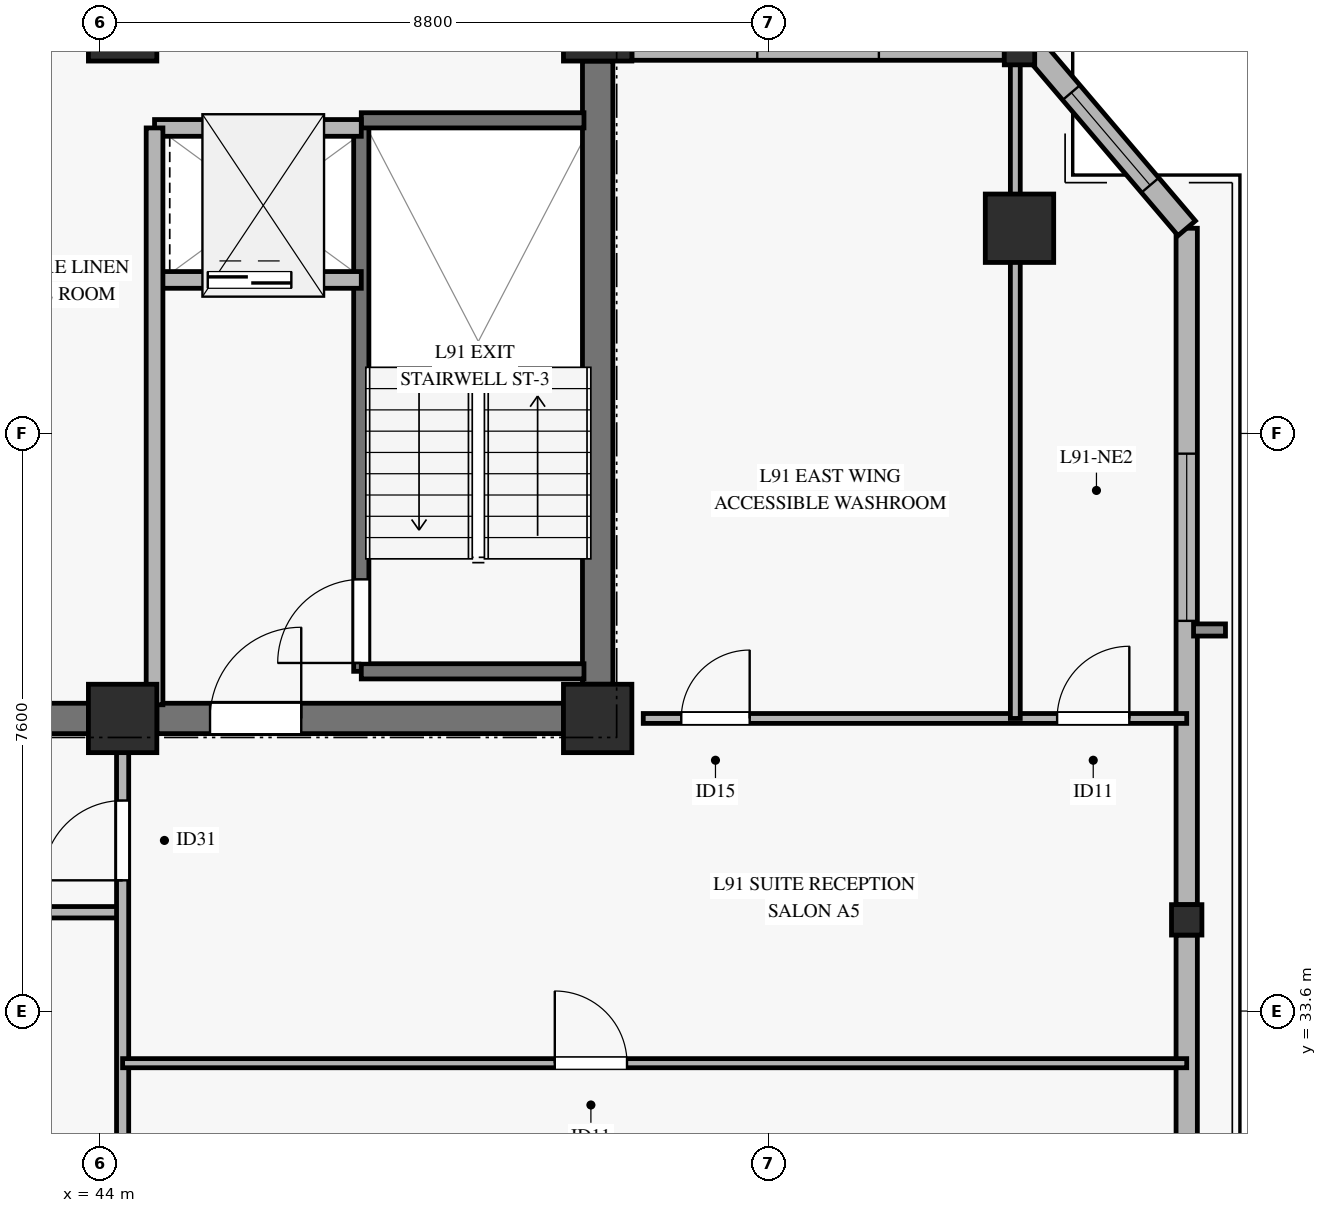
"""IFC4 building model, lengths in metres.
Left out: names, types, materials, properties, quantities, classifications, styles, units other than length and angle.
Written with IfcOpenShell. Run it as: python <this file> out.ifc"""

import sys

from ifc_helpers import new_model, si_unit, direction, frame, frame_2d, origin, origin_2d, place, context, subcontext, project, spatial, rectangle, hollow_rectangle, extrude, source, transform, mapped, element, fill, save


model = new_model("IFC4")
c1 = context("Model", 3, precision=1e-05, world=origin(), true_north=direction((0.0, 1.0)))
c2 = subcontext(c1, "Body", "Model", "MODEL_VIEW")
j1 = project(units=[si_unit("LENGTHUNIT", "METRE"), si_unit("PLANEANGLEUNIT", "RADIAN")], contexts=[c1])
p1 = place(None, origin())
s1 = spatial("IfcSite", under=j1, at=p1, CompositionType="ELEMENT")
p2 = place(p1, origin())
s2 = spatial("IfcBuilding", under=s1, at=p2, CompositionType="ELEMENT")
p3 = place(p2, frame((0.0, 0.0, 349.3)))
s3 = spatial("IfcBuildingStorey", under=s2, at=p3, CompositionType="ELEMENT", Elevation=349.3)
m1 = source(origin(), c2, "Body", "SweptSolid", [
    extrude(rectangle(XDim=0.9, YDim=0.9, at=origin_2d()), origin(), (0.0, 0.0, 1.0), 3.08),
])
for number, where, z_axis, x_axis in (
    (1, (44.3, 37.45, 0.0), (0.0, 0.0, 1.0), (1.0, 0.0, 0.0)),
    (2, (44.3, 46.55, 0.0), (0.0, 0.0, 1.0), (1.0, 0.0, 0.0)),
    (3, (50.55, 37.45, 0.0), (0.0, 0.0, 1.0), (1.0, 0.0, 0.0)),
    (4, (50.55, 46.55, 0.0), (0.0, 0.0, 1.0), (1.0, 0.0, 0.0)),
):
    element("IfcColumn", number, at=place(p3, frame(where, z_axis=z_axis, x_axis=x_axis)), inside=s3, PredefinedType="PILASTER", context=c2, shape_type="MappedRepresentation", body=[
        mapped(m1, transform((0.0, 0.0, 0.0), x_axis=(1.0, 0.0, 0.0), y_axis=(0.0, 1.0, 0.0), z_axis=(0.0, 0.0, 1.0), scale=1.0)),
    ])
p4 = place(p3, frame((36.05, 37.45, 0.0), z_axis=(0.0, 0.0, 1.0), x_axis=(1.0, 0.0, 0.0)))
e5 = element("IfcWall", 5, at=p4, inside=s3, PredefinedType="SHEAR", context=c2, shape_type="SweptSolid", body=[
    extrude(rectangle(XDim=7.8, YDim=0.4, at=frame_2d((3.9, 0.0))), origin(), (0.0, 0.0, 1.0), 3.08),
])
p5 = place(p3, frame((44.75, 37.45, 0.0), z_axis=(0.0, 0.0, 1.0), x_axis=(1.0, 0.0, 0.0)))
e6 = element("IfcWall", 6, at=p5, inside=s3, PredefinedType="SHEAR", context=c2, shape_type="SweptSolid", body=[
    extrude(rectangle(XDim=5.35, YDim=0.4, at=frame_2d((2.675, 0.0))), origin(), (0.0, 0.0, 1.0), 3.08),
])
p6 = place(p5, frame((0.7, 0.0, 0.0)))
e7 = element("IfcOpeningElement", 7, at=p6, cuts=e6, PredefinedType="OPENING", context=c2, shape_type="SweptSolid", body=[
    extrude(rectangle(XDim=1.2, YDim=2.15, at=frame_2d((0.6, 1.075))), frame((0.0, 0.21, 0.0), z_axis=(0.0, -1.0, 0.0), x_axis=(1.0, 0.0, 0.0)), (0.0, 0.0, 1.0), 0.42),
])
p7 = place(p3, frame((50.55, 37.9, 0.0), z_axis=(0.0, 0.0, 1.0), x_axis=(0.0, 1.0, 0.0)))
e8 = element("IfcWall", 8, at=p7, inside=s3, PredefinedType="SHEAR", context=c2, shape_type="SweptSolid", body=[
    extrude(rectangle(XDim=8.2, YDim=0.4, at=frame_2d((4.1, 0.0))), origin(), (0.0, 0.0, 1.0), 3.08),
])
m2 = source(origin(), c2, "Body", "SweptSolid", [
    extrude(hollow_rectangle(XDim=0.9, YDim=0.9, WallThickness=0.04, at=origin_2d()), origin(), (0.0, 0.0, 1.0), 3.08),
])
p8 = place(p3, frame((56.1, 43.9, 0.0), z_axis=(0.0, 0.0, 1.0), x_axis=(1.0, 0.0, 0.0)))
e9 = element("IfcColumn", 9, at=p8, inside=s3, PredefinedType="COLUMN", context=c2, shape_type="MappedRepresentation", body=[
    mapped(m2, transform((0.0, 0.0, 0.0), x_axis=(1.0, 0.0, 0.0), y_axis=(0.0, 1.0, 0.0), z_axis=(0.0, 0.0, 1.0), scale=1.0)),
])
m3 = source(origin(), c2, "Body", "SweptSolid", [
    extrude(hollow_rectangle(XDim=0.4, YDim=0.4, WallThickness=0.02, at=origin_2d()), origin(), (0.0, 0.0, 1.0), 3.08),
])
for number, where, z_axis, x_axis in (
    (10, (58.3, 34.8, 0.0), (0.0, 0.0, 1.0), (1.0, 0.0, 0.0)),
    (11, (56.1, 46.25, 0.0), (0.0, 0.0, 1.0), (1.0, 0.0, 0.0)),
):
    element("IfcColumn", number, at=place(p3, frame(where, z_axis=z_axis, x_axis=x_axis)), inside=s3, PredefinedType="COLUMN", context=c2, shape_type="MappedRepresentation", body=[
        mapped(m3, transform((0.0, 0.0, 0.0), x_axis=(1.0, 0.0, 0.0), y_axis=(0.0, 1.0, 0.0), z_axis=(0.0, 0.0, 1.0), scale=1.0)),
    ])
p9 = place(p3, frame((58.3, 25.7, 0.0), z_axis=(0.0, 0.0, 1.0), x_axis=(0.0, 1.0, 0.0)))
e12 = element("IfcWall", 12, at=p9, inside=s3, PredefinedType="SOLIDWALL", context=c2, shape_type="SweptSolid", body=[
    extrude(rectangle(XDim=8.9, YDim=0.28, at=frame_2d((4.45, 0.0))), origin(), (0.0, 0.0, 1.0), 2.71),
])
p10 = place(p9, frame((0.468, 0.0, 0.35)))
e13 = element("IfcOpeningElement", 13, at=p10, cuts=e12, PredefinedType="OPENING", context=c2, shape_type="SweptSolid", body=[
    extrude(rectangle(XDim=1.6, YDim=2.0, at=frame_2d((0.8, 1.0))), frame((0.0, 0.15, 0.0), z_axis=(0.0, -1.0, 0.0), x_axis=(1.0, 0.0, 0.0)), (0.0, 0.0, 1.0), 0.3),
])
p11 = place(p3, frame((58.3, 35.0, 0.0), z_axis=(0.0, 0.0, 1.0), x_axis=(0.0, 1.0, 0.0)))
e14 = element("IfcWall", 14, at=p11, inside=s3, PredefinedType="SOLIDWALL", context=c2, shape_type="SweptSolid", body=[
    extrude(rectangle(XDim=8.9, YDim=0.28, at=frame_2d((4.45, 0.0))), origin(), (0.0, 0.0, 1.0), 2.71),
])
p12 = place(p11, frame((3.734, 0.0, 0.35)))
e15 = element("IfcOpeningElement", 15, at=p12, cuts=e14, PredefinedType="OPENING", context=c2, shape_type="SweptSolid", body=[
    extrude(rectangle(XDim=2.2, YDim=2.1, at=frame_2d((1.1, 1.05))), frame((0.0, 0.15, 0.0), z_axis=(0.0, -1.0, 0.0), x_axis=(1.0, 0.0, 0.0)), (0.0, 0.0, 1.0), 0.3),
])
p13 = place(p3, frame((51.0, 46.25, 0.0), z_axis=(0.0, 0.0, 1.0), x_axis=(1.0, 0.0, 0.0)))
e16 = element("IfcWall", 16, at=p13, inside=s3, PredefinedType="SOLIDWALL", context=c2, shape_type="SweptSolid", body=[
    extrude(rectangle(XDim=4.9, YDim=0.28, at=frame_2d((2.45, 0.0))), origin(), (0.0, 0.0, 1.0), 2.71),
])
p14 = place(p13, frame((1.65, 0.0, 0.45)))
e17 = element("IfcOpeningElement", 17, at=p14, cuts=e16, PredefinedType="OPENING", context=c2, shape_type="SweptSolid", body=[
    extrude(rectangle(XDim=1.6, YDim=2.0, at=frame_2d((0.8, 1.0))), frame((0.0, 0.15, 0.0), z_axis=(0.0, -1.0, 0.0), x_axis=(1.0, 0.0, 0.0)), (0.0, 0.0, 1.0), 0.3),
])
p15 = place(p3, frame((58.3, 43.9, 0.0), z_axis=(0.0, 0.0, 1.0), x_axis=(-0.648103010114, 0.761552682538, 0.0)))
e18 = element("IfcWall", 18, at=p15, inside=s3, PredefinedType="SOLIDWALL", context=c2, shape_type="SweptSolid", body=[
    extrude(rectangle(XDim=3.086, YDim=0.3, at=frame_2d((1.543, 0.0))), origin(), (0.0, 0.0, 1.0), 2.71),
])
p16 = place(p15, frame((0.743, 0.0, 0.45)))
e19 = element("IfcOpeningElement", 19, at=p16, cuts=e18, PredefinedType="OPENING", context=c2, shape_type="SweptSolid", body=[
    extrude(rectangle(XDim=1.6, YDim=2.0, at=frame_2d((0.8, 1.0))), frame((0.0, 0.16, 0.0), z_axis=(0.0, -1.0, 0.0), x_axis=(1.0, 0.0, 0.0)), (0.0, 0.0, 1.0), 0.32),
])
p17 = place(p3, frame((47.44, 38.07, 0.0), z_axis=(0.0, 0.0, 1.0), x_axis=(0.0, 1.0, 0.0)))
e20 = element("IfcWall", 20, at=p17, inside=s3, PredefinedType="SOLIDWALL", context=c2, shape_type="SweptSolid", body=[
    extrude(rectangle(XDim=7.25, YDim=0.2, at=frame_2d((3.625, 0.0))), origin(), (0.0, 0.0, 1.0), 3.4),
])
p18 = place(p17, frame((0.11, 0.0, 0.0)))
e21 = element("IfcOpeningElement", 21, at=p18, cuts=e20, PredefinedType="OPENING", context=c2, shape_type="SweptSolid", body=[
    extrude(rectangle(XDim=1.1, YDim=2.15, at=frame_2d((0.55, 1.075))), frame((0.0, 0.11, 0.0), z_axis=(0.0, -1.0, 0.0), x_axis=(1.0, 0.0, 0.0)), (0.0, 0.0, 1.0), 0.22),
])
for number, where, z_axis, x_axis in (
    (22, (47.44, 45.32, 0.0), (0.0, 0.0, 1.0), (1.0, 0.0, 0.0)),
    (23, (47.44, 38.07, 0.0), (0.0, 0.0, 1.0), (1.0, 0.0, 0.0)),
):
    element("IfcWall", number, at=place(p3, frame(where, z_axis=z_axis, x_axis=x_axis)), inside=s3, PredefinedType="SOLIDWALL", context=c2, shape_type="SweptSolid", body=[
        extrude(rectangle(XDim=2.93, YDim=0.2, at=frame_2d((1.465, 0.0))), origin(), (0.0, 0.0, 1.0), 3.4),
    ])
p19 = place(p3, frame((44.72, 43.22, 0.0), z_axis=(0.0, 0.0, 1.0), x_axis=(1.0, 0.0, 0.0)))
e24 = element("IfcWall", 24, at=p19, inside=s3, PredefinedType="SOLIDWALL", context=c2, shape_type="SweptSolid", body=[
    extrude(rectangle(XDim=2.72, YDim=0.22, at=frame_2d((1.36, 0.0))), origin(), (0.0, 0.0, 1.0), 3.08),
])
p20 = place(p19, frame((0.7, 0.0, 0.0)))
e25 = element("IfcOpeningElement", 25, at=p20, cuts=e24, PredefinedType="OPENING", context=c2, shape_type="SweptSolid", body=[
    extrude(rectangle(XDim=1.1, YDim=2.2, at=frame_2d((0.55, 1.1))), frame((0.0, 0.12, 0.0), z_axis=(0.0, -1.0, 0.0), x_axis=(1.0, 0.0, 0.0)), (0.0, 0.0, 1.0), 0.24),
])
p21 = place(p3, frame((44.72, 45.22, 0.0), z_axis=(0.0, 0.0, 1.0), x_axis=(1.0, 0.0, 0.0)))
e26 = element("IfcWall", 26, at=p21, inside=s3, PredefinedType="SOLIDWALL", context=c2, shape_type="SweptSolid", body=[
    extrude(rectangle(XDim=2.72, YDim=0.22, at=frame_2d((1.36, 0.0))), origin(), (0.0, 0.0, 1.0), 3.08),
])
p22 = place(p3, frame((44.72, 37.63, 0.0), z_axis=(0.0, 0.0, 1.0), x_axis=(0.0, 1.0, 0.0)))
e27 = element("IfcWall", 27, at=p22, inside=s3, PredefinedType="SOLIDWALL", context=c2, shape_type="SweptSolid", body=[
    extrude(rectangle(XDim=7.59, YDim=0.22, at=frame_2d((3.795, 0.0))), origin(), (0.0, 0.0, 1.0), 3.08),
])
p23 = place(p3, frame((21.4, 34.9, 0.0), z_axis=(0.0, 0.0, 1.0), x_axis=(1.0, 0.0, 0.0)))
e28 = element("IfcWall", 28, at=p23, inside=s3, PredefinedType="PARTITIONING", context=c2, shape_type="SweptSolid", body=[
    extrude(rectangle(XDim=22.9, YDim=0.15, at=frame_2d((11.45, 0.0))), origin(), (0.0, 0.0, 1.0), 2.365),
])
p24 = place(p23, frame((3.775, 0.0, 0.0)))
e29 = element("IfcOpeningElement", 29, at=p24, cuts=e28, PredefinedType="OPENING", context=c2, shape_type="SweptSolid", body=[
    extrude(rectangle(XDim=1.05, YDim=2.15, at=frame_2d((0.525, 1.075))), frame((0.0, 0.085, 0.0), z_axis=(0.0, -1.0, 0.0), x_axis=(1.0, 0.0, 0.0)), (0.0, 0.0, 1.0), 0.17),
])
p25 = place(p23, frame((12.375, 0.0, 0.0)))
e30 = element("IfcOpeningElement", 30, at=p25, cuts=e28, PredefinedType="OPENING", context=c2, shape_type="SweptSolid", body=[
    extrude(rectangle(XDim=1.05, YDim=2.15, at=frame_2d((0.525, 1.075))), frame((0.0, 0.085, 0.0), z_axis=(0.0, -1.0, 0.0), x_axis=(1.0, 0.0, 0.0)), (0.0, 0.0, 1.0), 0.17),
])
p26 = place(p23, frame((19.535, 0.0, 0.0)))
e31 = element("IfcOpeningElement", 31, at=p26, cuts=e28, PredefinedType="OPENING", context=c2, shape_type="SweptSolid", body=[
    extrude(rectangle(XDim=1.05, YDim=2.15, at=frame_2d((0.525, 1.075))), frame((0.0, 0.085, 0.0), z_axis=(0.0, -1.0, 0.0), x_axis=(1.0, 0.0, 0.0)), (0.0, 0.0, 1.0), 0.17),
])
p27 = place(p3, frame((44.3, 23.5, 0.0), z_axis=(0.0, 0.0, 1.0), x_axis=(0.0, 1.0, 0.0)))
e32 = element("IfcWall", 32, at=p27, inside=s3, PredefinedType="PARTITIONING", context=c2, shape_type="SweptSolid", body=[
    extrude(rectangle(XDim=13.95, YDim=0.16, at=frame_2d((6.975, 0.0))), origin(), (0.0, 0.0, 1.0), 2.365),
])
p28 = place(p27, frame((11.82, 0.0, 0.0)))
e33 = element("IfcOpeningElement", 33, at=p28, cuts=e32, PredefinedType="OPENING", context=c2, shape_type="SweptSolid", body=[
    extrude(rectangle(XDim=1.05, YDim=2.15, at=frame_2d((0.525, 1.075))), frame((0.0, 0.09, 0.0), z_axis=(0.0, -1.0, 0.0), x_axis=(1.0, 0.0, 0.0)), (0.0, 0.0, 1.0), 0.18),
])
p29 = place(p3, frame((44.3, 32.914, 0.0), z_axis=(0.0, 0.0, 1.0), x_axis=(1.0, 0.0, 0.0)))
e34 = element("IfcWall", 34, at=p29, inside=s3, PredefinedType="PARTITIONING", context=c2, shape_type="SweptSolid", body=[
    extrude(rectangle(XDim=14.0, YDim=0.12, at=frame_2d((7.0, 0.0))), origin(), (0.0, 0.0, 1.0), 2.365),
])
p30 = place(p29, frame((5.686, 0.0, 0.0)))
e35 = element("IfcOpeningElement", 35, at=p30, cuts=e34, PredefinedType="OPENING", context=c2, shape_type="SweptSolid", body=[
    extrude(rectangle(XDim=0.95, YDim=2.1, at=frame_2d((0.475, 1.05))), frame((0.0, 0.07, 0.0), z_axis=(0.0, -1.0, 0.0), x_axis=(1.0, 0.0, 0.0)), (0.0, 0.0, 1.0), 0.14),
])
p31 = place(p3, frame((51.15, 37.45, 0.0), z_axis=(0.0, 0.0, 1.0), x_axis=(1.0, 0.0, 0.0)))
e36 = element("IfcWall", 36, at=p31, inside=s3, PredefinedType="PARTITIONING", context=c2, shape_type="SweptSolid", body=[
    extrude(rectangle(XDim=7.15, YDim=0.13, at=frame_2d((3.575, 0.0))), origin(), (0.0, 0.0, 1.0), 2.715),
])
p32 = place(p31, frame((0.5, 0.0, 0.0)))
e37 = element("IfcOpeningElement", 37, at=p32, cuts=e36, PredefinedType="OPENING", context=c2, shape_type="SweptSolid", body=[
    extrude(rectangle(XDim=0.9, YDim=2.1, at=frame_2d((0.45, 1.05))), frame((0.0, 0.075, 0.0), z_axis=(0.0, -1.0, 0.0), x_axis=(1.0, 0.0, 0.0)), (0.0, 0.0, 1.0), 0.15),
])
p33 = place(p31, frame((5.445, 0.0, 0.0)))
e38 = element("IfcOpeningElement", 38, at=p33, cuts=e36, PredefinedType="OPENING", context=c2, shape_type="SweptSolid", body=[
    extrude(rectangle(XDim=0.95, YDim=2.1, at=frame_2d((0.475, 1.05))), frame((0.0, 0.075, 0.0), z_axis=(0.0, -1.0, 0.0), x_axis=(1.0, 0.0, 0.0)), (0.0, 0.0, 1.0), 0.15),
])
p34 = place(p3, frame((56.045, 37.45, 0.0), z_axis=(0.0, 0.0, 1.0), x_axis=(0.0, 1.0, 0.0)))
e39 = element("IfcWall", 39, at=p34, inside=s3, PredefinedType="PARTITIONING", context=c2, shape_type="SweptSolid", body=[
    extrude(rectangle(XDim=8.8, YDim=0.13, at=frame_2d((4.4, 0.0))), origin(), (0.0, 0.0, 1.0), 2.715),
])
m4 = source(origin(), c2, "Body", "SweptSolid", [
    extrude(rectangle(XDim=2.2, YDim=2.1, at=frame_2d((1.1, 1.05))), frame((0.0, 0.03, 0.0), z_axis=(0.0, -1.0, 0.0), x_axis=(1.0, 0.0, 0.0)), (0.0, 0.0, 1.0), 0.06),
])
p35 = place(p12, origin())
e40 = element("IfcWindow", 40, at=p35, inside=s3, PartitioningType="SINGLE_PANEL", PredefinedType="WINDOW", context=c2, shape_type="MappedRepresentation", body=[
    mapped(m4, transform((0.0, 0.0, 0.0), x_axis=(1.0, 0.0, 0.0), y_axis=(0.0, 1.0, 0.0), z_axis=(0.0, 0.0, 1.0), scale=1.0)),
])
fill(e15, e40)
m5 = source(origin(), c2, "Body", "SweptSolid", [
    extrude(rectangle(XDim=1.6, YDim=2.0, at=frame_2d((0.8, 1.0))), frame((0.0, 0.03, 0.0), z_axis=(0.0, -1.0, 0.0), x_axis=(1.0, 0.0, 0.0)), (0.0, 0.0, 1.0), 0.06),
])
p36 = place(p16, origin())
e41 = element("IfcWindow", 41, at=p36, inside=s3, PartitioningType="SINGLE_PANEL", PredefinedType="WINDOW", context=c2, shape_type="MappedRepresentation", body=[
    mapped(m5, transform((0.0, 0.0, 0.0), x_axis=(1.0, 0.0, 0.0), y_axis=(0.0, 1.0, 0.0), z_axis=(0.0, 0.0, 1.0), scale=1.0)),
])
fill(e19, e41)
m6 = source(origin(), c2, "Body", "SweptSolid", [
    extrude(rectangle(XDim=1.1, YDim=2.15, at=frame_2d((0.55, 1.075))), frame((0.0, 0.025, 0.0), z_axis=(0.0, -1.0, 0.0), x_axis=(1.0, 0.0, 0.0)), (0.0, 0.0, 1.0), 0.05),
])
p37 = place(p18, origin())
e42 = element("IfcDoor", 42, at=p37, inside=s3, OperationType="SINGLE_SWING_LEFT", PredefinedType="DOOR", context=c2, shape_type="MappedRepresentation", body=[
    mapped(m6, transform((0.0, 0.0, 0.0), x_axis=(1.0, 0.0, 0.0), y_axis=(0.0, 1.0, 0.0), z_axis=(0.0, 0.0, 1.0), scale=1.0)),
])
fill(e21, e42)
m7 = source(origin(), c2, "Body", "SweptSolid", [
    extrude(rectangle(XDim=1.1, YDim=2.2, at=frame_2d((0.55, 1.1))), frame((0.0, 0.025, 0.0), z_axis=(0.0, -1.0, 0.0), x_axis=(1.0, 0.0, 0.0)), (0.0, 0.0, 1.0), 0.05),
])
p38 = place(p20, origin())
e43 = element("IfcDoor", 43, at=p38, inside=s3, OperationType="SLIDING_TO_LEFT", PredefinedType="DOOR", context=c2, shape_type="MappedRepresentation", body=[
    mapped(m7, transform((0.0, 0.0, 0.0), x_axis=(1.0, 0.0, 0.0), y_axis=(0.0, 1.0, 0.0), z_axis=(0.0, 0.0, 1.0), scale=1.0)),
])
fill(e25, e43)
m8 = source(origin(), c2, "Body", "SweptSolid", [
    extrude(rectangle(XDim=1.2, YDim=2.15, at=frame_2d((0.6, 1.075))), frame((0.0, 0.025, 0.0), z_axis=(0.0, -1.0, 0.0), x_axis=(1.0, 0.0, 0.0)), (0.0, 0.0, 1.0), 0.05),
])
p39 = place(p6, origin())
e44 = element("IfcDoor", 44, at=p39, inside=s3, OperationType="SINGLE_SWING_RIGHT", PredefinedType="DOOR", context=c2, shape_type="MappedRepresentation", body=[
    mapped(m8, transform((0.0, 0.0, 0.0), x_axis=(1.0, 0.0, 0.0), y_axis=(0.0, 1.0, 0.0), z_axis=(0.0, 0.0, 1.0), scale=1.0)),
])
fill(e7, e44)
m9 = source(origin(), c2, "Body", "SweptSolid", [
    extrude(rectangle(XDim=1.05, YDim=2.15, at=frame_2d((0.525, 1.075))), frame((0.0, 0.025, 0.0), z_axis=(0.0, -1.0, 0.0), x_axis=(1.0, 0.0, 0.0)), (0.0, 0.0, 1.0), 0.05),
])
p40 = place(p28, origin())
e45 = element("IfcDoor", 45, at=p40, inside=s3, OperationType="SINGLE_SWING_LEFT", PredefinedType="DOOR", context=c2, shape_type="MappedRepresentation", body=[
    mapped(m9, transform((0.0, 0.0, 0.0), x_axis=(1.0, 0.0, 0.0), y_axis=(0.0, 1.0, 0.0), z_axis=(0.0, 0.0, 1.0), scale=1.0)),
])
fill(e33, e45)
m10 = source(origin(), c2, "Body", "SweptSolid", [
    extrude(rectangle(XDim=0.95, YDim=2.1, at=frame_2d((0.475, 1.05))), frame((0.0, 0.025, 0.0), z_axis=(0.0, -1.0, 0.0), x_axis=(1.0, 0.0, 0.0)), (0.0, 0.0, 1.0), 0.05),
])
p41 = place(p30, origin())
e46 = element("IfcDoor", 46, at=p41, inside=s3, OperationType="SINGLE_SWING_LEFT", PredefinedType="DOOR", context=c2, shape_type="MappedRepresentation", body=[
    mapped(m10, transform((0.0, 0.0, 0.0), x_axis=(1.0, 0.0, 0.0), y_axis=(0.0, 1.0, 0.0), z_axis=(0.0, 0.0, 1.0), scale=1.0)),
])
fill(e35, e46)
m11 = source(origin(), c2, "Body", "SweptSolid", [
    extrude(rectangle(XDim=0.9, YDim=2.1, at=frame_2d((0.45, 1.05))), frame((0.0, 0.025, 0.0), z_axis=(0.0, -1.0, 0.0), x_axis=(1.0, 0.0, 0.0)), (0.0, 0.0, 1.0), 0.05),
])
p42 = place(p32, origin())
e47 = element("IfcDoor", 47, at=p42, inside=s3, OperationType="SINGLE_SWING_RIGHT", PredefinedType="DOOR", context=c2, shape_type="MappedRepresentation", body=[
    mapped(m11, transform((0.0, 0.0, 0.0), x_axis=(1.0, 0.0, 0.0), y_axis=(0.0, 1.0, 0.0), z_axis=(0.0, 0.0, 1.0), scale=1.0)),
])
fill(e37, e47)
p43 = place(p33, origin())
e48 = element("IfcDoor", 48, at=p43, inside=s3, OperationType="SINGLE_SWING_RIGHT", PredefinedType="DOOR", context=c2, shape_type="MappedRepresentation", body=[
    mapped(m10, transform((0.0, 0.0, 0.0), x_axis=(1.0, 0.0, 0.0), y_axis=(0.0, 1.0, 0.0), z_axis=(0.0, 0.0, 1.0), scale=1.0)),
])
fill(e38, e48)
save(model, sys.argv[1])
